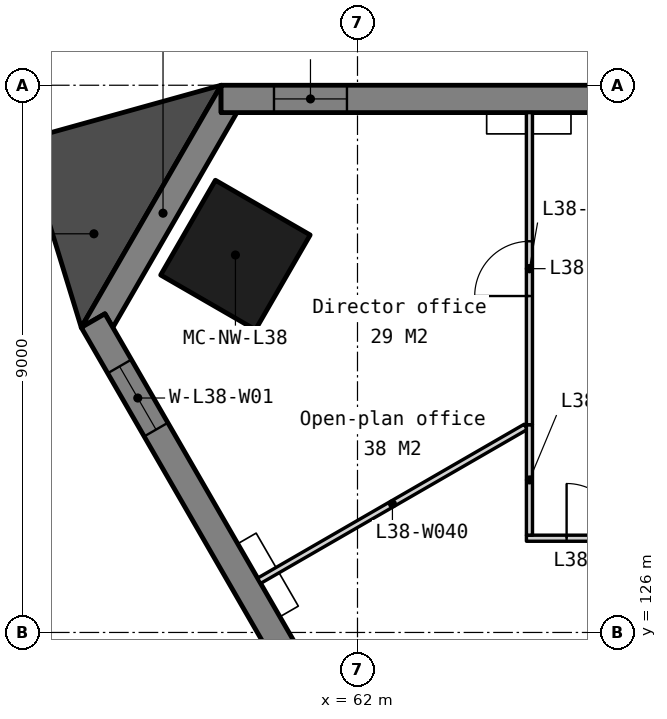
"""IFC4 building model, lengths in metres.
Left out: names, types, materials, properties, quantities, classifications, styles, units other than length and angle.
Written with IfcOpenShell. Run it as: python <this file> out.ifc"""

import sys

from ifc_helpers import new_model, si_unit, direction, frame, frame_2d, origin, origin_2d, place, context, subcontext, project, spatial, polyline, rectangle, outline, extrude, element, fill, save


model = new_model("IFC4")
c1 = context("Model", 3, precision=1e-05, world=origin(), true_north=direction((0.0, 1.0)))
c2 = subcontext(c1, "Body", "Model", "MODEL_VIEW")
j1 = project(units=[si_unit("LENGTHUNIT", "METRE"), si_unit("PLANEANGLEUNIT", "RADIAN")], contexts=[c1])
p1 = place(None, origin())
s1 = spatial("IfcSite", under=j1, at=p1, CompositionType="ELEMENT")
p2 = place(p1, origin())
s2 = spatial("IfcBuilding", under=s1, at=p2, CompositionType="ELEMENT")
p3 = place(p2, frame((0.0, 0.0, 152.0)))
s3 = spatial("IfcBuildingStorey", under=s2, at=p3, CompositionType="ELEMENT", Elevation=152.0)
p4 = place(p3, frame((59.993, 132.208, 0.0), z_axis=(0.0, 0.0, 1.0), x_axis=(-0.5, -0.866025403784, 0.0)))
e1 = element("IfcColumn", 1, at=p4, inside=s3, PredefinedType="COLUMN", context=c2, shape_type="SweptSolid", body=[
    extrude(rectangle(XDim=1.8, YDim=1.8, at=origin_2d()), origin(), (0.0, 0.0, 1.0), 3.9),
])
p5 = place(p3, frame((0.0, 0.0, -0.15)))
e2 = element("IfcWall", 2, at=p5, inside=s3, PredefinedType="SOLIDWALL", context=c2, shape_type="SweptSolid", body=[
    extrude(outline(polyline([(59.757, 135.0), (59.757, 134.55), (60.017, 134.55), (57.977, 131.016), (57.847, 131.241), (57.457, 131.016), (59.757, 135.0)])), origin(), (0.0, 0.0, 1.0), 3.9),
])
p6 = place(p3, frame((100.243, 134.775, -0.15), z_axis=(0.0, 0.0, 1.0), x_axis=(-1.0, 0.0, 0.0)))
e3 = element("IfcWall", 3, at=p6, inside=s3, PredefinedType="SOLIDWALL", context=c2, shape_type="SweptSolid", body=[
    extrude(outline(polyline([(40.486, 0.0), (40.486, 3.9), (0.0, 3.9), (0.0, 0.0), (40.486, 0.0)])), frame((0.0, 0.225, 0.0), z_axis=(0.0, -1.0, 0.0), x_axis=(1.0, 0.0, 0.0)), (0.0, 0.0, 1.0), 0.45),
])
p7 = place(p6, frame((0.87, 0.0, 0.95)))
e4 = element("IfcOpeningElement", 4, at=p7, cuts=e3, PredefinedType="OPENING", context=c2, shape_type="SweptSolid", body=[
    extrude(rectangle(XDim=1.2, YDim=2.2, at=frame_2d((0.6, 1.1))), frame((0.0, 0.235, 0.0), z_axis=(0.0, -1.0, 0.0), x_axis=(1.0, 0.0, 0.0)), (0.0, 0.0, 1.0), 0.47),
])
p8 = place(p6, frame((8.072, 0.0, 0.95)))
e5 = element("IfcOpeningElement", 5, at=p8, cuts=e3, PredefinedType="OPENING", context=c2, shape_type="SweptSolid", body=[
    extrude(rectangle(XDim=1.8, YDim=2.2, at=frame_2d((0.9, 1.1))), frame((0.0, 0.235, 0.0), z_axis=(0.0, -1.0, 0.0), x_axis=(1.0, 0.0, 0.0)), (0.0, 0.0, 1.0), 0.47),
])
p9 = place(p6, frame((10.372, 0.0, 0.95)))
e6 = element("IfcOpeningElement", 6, at=p9, cuts=e3, PredefinedType="OPENING", context=c2, shape_type="SweptSolid", body=[
    extrude(rectangle(XDim=1.8, YDim=2.2, at=frame_2d((0.9, 1.1))), frame((0.0, 0.235, 0.0), z_axis=(0.0, -1.0, 0.0), x_axis=(1.0, 0.0, 0.0)), (0.0, 0.0, 1.0), 0.47),
])
p10 = place(p6, frame((18.193, 0.0, 0.95)))
e7 = element("IfcOpeningElement", 7, at=p10, cuts=e3, PredefinedType="OPENING", context=c2, shape_type="SweptSolid", body=[
    extrude(rectangle(XDim=1.8, YDim=2.2, at=frame_2d((0.9, 1.1))), frame((0.0, 0.235, 0.0), z_axis=(0.0, -1.0, 0.0), x_axis=(1.0, 0.0, 0.0)), (0.0, 0.0, 1.0), 0.47),
])
p11 = place(p6, frame((20.493, 0.0, 0.95)))
e8 = element("IfcOpeningElement", 8, at=p11, cuts=e3, PredefinedType="OPENING", context=c2, shape_type="SweptSolid", body=[
    extrude(rectangle(XDim=1.8, YDim=2.2, at=frame_2d((0.9, 1.1))), frame((0.0, 0.235, 0.0), z_axis=(0.0, -1.0, 0.0), x_axis=(1.0, 0.0, 0.0)), (0.0, 0.0, 1.0), 0.47),
])
p12 = place(p6, frame((28.315, 0.0, 0.95)))
e9 = element("IfcOpeningElement", 9, at=p12, cuts=e3, PredefinedType="OPENING", context=c2, shape_type="SweptSolid", body=[
    extrude(rectangle(XDim=1.8, YDim=2.2, at=frame_2d((0.9, 1.1))), frame((0.0, 0.235, 0.0), z_axis=(0.0, -1.0, 0.0), x_axis=(1.0, 0.0, 0.0)), (0.0, 0.0, 1.0), 0.47),
])
p13 = place(p6, frame((30.615, 0.0, 0.95)))
e10 = element("IfcOpeningElement", 10, at=p13, cuts=e3, PredefinedType="OPENING", context=c2, shape_type="SweptSolid", body=[
    extrude(rectangle(XDim=1.8, YDim=2.2, at=frame_2d((0.9, 1.1))), frame((0.0, 0.235, 0.0), z_axis=(0.0, -1.0, 0.0), x_axis=(1.0, 0.0, 0.0)), (0.0, 0.0, 1.0), 0.47),
])
p14 = place(p6, frame((38.417, 0.0, 0.95)))
e11 = element("IfcOpeningElement", 11, at=p14, cuts=e3, PredefinedType="OPENING", context=c2, shape_type="SweptSolid", body=[
    extrude(rectangle(XDim=1.2, YDim=2.2, at=frame_2d((0.6, 1.1))), frame((0.0, 0.235, 0.0), z_axis=(0.0, -1.0, 0.0), x_axis=(1.0, 0.0, 0.0)), (0.0, 0.0, 1.0), 0.47),
])
p15 = place(p3, frame((57.652, 131.129, -0.15), z_axis=(0.0, 0.0, 1.0), x_axis=(0.50000511266, -0.866022451969, 0.0)))
e12 = element("IfcWall", 12, at=p15, inside=s3, PredefinedType="SOLIDWALL", context=c2, shape_type="SweptSolid", body=[
    extrude(outline(polyline([(0.0, 0.0), (0.0, 3.9), (18.243, 3.9), (18.243, 0.0), (0.0, 0.0)])), frame((0.0, 0.225, 0.0), z_axis=(0.0, -1.0, 0.0), x_axis=(1.0, 0.0, 0.0)), (0.0, 0.0, 1.0), 0.45),
])
p16 = place(p15, frame((0.87, 0.0, 0.95)))
e13 = element("IfcOpeningElement", 13, at=p16, cuts=e12, PredefinedType="OPENING", context=c2, shape_type="SweptSolid", body=[
    extrude(rectangle(XDim=1.2, YDim=2.2, at=frame_2d((0.6, 1.1))), frame((0.0, 0.235, 0.0), z_axis=(0.0, -1.0, 0.0), x_axis=(1.0, 0.0, 0.0)), (0.0, 0.0, 1.0), 0.47),
])
p17 = place(p15, frame((8.072, 0.0, 0.95)))
e14 = element("IfcOpeningElement", 14, at=p17, cuts=e12, PredefinedType="OPENING", context=c2, shape_type="SweptSolid", body=[
    extrude(rectangle(XDim=1.8, YDim=2.2, at=frame_2d((0.9, 1.1))), frame((0.0, 0.235, 0.0), z_axis=(0.0, -1.0, 0.0), x_axis=(1.0, 0.0, 0.0)), (0.0, 0.0, 1.0), 0.47),
])
p18 = place(p15, frame((10.372, 0.0, 0.95)))
e15 = element("IfcOpeningElement", 15, at=p18, cuts=e12, PredefinedType="OPENING", context=c2, shape_type="SweptSolid", body=[
    extrude(rectangle(XDim=1.8, YDim=2.2, at=frame_2d((0.9, 1.1))), frame((0.0, 0.235, 0.0), z_axis=(0.0, -1.0, 0.0), x_axis=(1.0, 0.0, 0.0)), (0.0, 0.0, 1.0), 0.47),
])
p19 = place(p3, frame((0.0, 0.0, -0.15)))
e16 = element("IfcWall", 16, at=p19, inside=s3, PredefinedType="SOLIDWALL", context=c2, shape_type="SweptSolid", body=[
    extrude(outline(polyline([(59.757, 135.0), (56.512, 134.097), (57.457, 131.016), (59.757, 135.0)])), origin(), (0.0, 0.0, 1.0), 3.9),
])
p20 = place(p3, frame((64.778, 127.55, 0.0), z_axis=(0.0, 0.0, 1.0), x_axis=(1.0, 0.0, 0.0)))
e17 = element("IfcWall", 17, at=p20, inside=s3, PredefinedType="PARTITIONING", context=c2, shape_type="SweptSolid", body=[
    extrude(rectangle(XDim=2.222, YDim=0.1, at=frame_2d((1.111, 0.0))), origin(), (0.0, 0.0, 1.0), 3.75),
])
p21 = place(p20, frame((0.661, 0.0, 0.0)))
e18 = element("IfcOpeningElement", 18, at=p21, cuts=e17, PredefinedType="OPENING", context=c2, shape_type="SweptSolid", body=[
    extrude(rectangle(XDim=0.9, YDim=2.1, at=frame_2d((0.45, 1.05))), frame((0.0, 0.06, 0.0), z_axis=(0.0, -1.0, 0.0), x_axis=(1.0, 0.0, 0.0)), (0.0, 0.0, 1.0), 0.12),
])
p22 = place(p3, frame((60.382, 126.85, 0.0), z_axis=(0.0, 0.0, 1.0), x_axis=(0.866041859802, 0.499971496258, 0.0)))
e19 = element("IfcWall", 19, at=p22, inside=s3, PredefinedType="PARTITIONING", context=c2, shape_type="SweptSolid", body=[
    extrude(rectangle(XDim=5.063, YDim=0.1, at=frame_2d((2.532, 0.0))), origin(), (0.0, 0.0, 1.0), 3.75),
])
p23 = place(p3, frame((64.828, 127.6, 0.0), z_axis=(0.0, 0.0, 1.0), x_axis=(-0.000268781068, 0.999999963878, 0.0)))
e20 = element("IfcWall", 20, at=p23, inside=s3, PredefinedType="PARTITIONING", context=c2, shape_type="SweptSolid", body=[
    extrude(rectangle(XDim=1.817, YDim=0.1, at=frame_2d((0.908, 0.0))), origin(), (0.0, 0.0, 1.0), 3.75),
])
p24 = place(p3, frame((64.828, 129.417, 0.0), z_axis=(0.0, 0.0, 1.0), x_axis=(0.0, 1.0, 0.0)))
e21 = element("IfcWall", 21, at=p24, inside=s3, PredefinedType="PARTITIONING", context=c2, shape_type="SweptSolid", body=[
    extrude(rectangle(XDim=5.133, YDim=0.1, at=frame_2d((2.567, 0.0))), origin(), (0.0, 0.0, 1.0), 3.75),
])
p25 = place(p24, frame((2.117, 0.0, 0.0)))
e22 = element("IfcOpeningElement", 22, at=p25, cuts=e21, PredefinedType="OPENING", context=c2, shape_type="SweptSolid", body=[
    extrude(rectangle(XDim=0.9, YDim=2.1, at=frame_2d((0.45, 1.05))), frame((0.0, 0.06, 0.0), z_axis=(0.0, -1.0, 0.0), x_axis=(1.0, 0.0, 0.0)), (0.0, 0.0, 1.0), 0.12),
])
p26 = place(p14, origin())
e23 = element("IfcWindow", 23, at=p26, inside=s3, PartitioningType="SINGLE_PANEL", PredefinedType="WINDOW", context=c2, shape_type="SweptSolid", body=[
    extrude(rectangle(XDim=1.2, YDim=2.2, at=frame_2d((0.6, 1.1))), frame((0.0, 0.03, 0.0), z_axis=(0.0, -1.0, 0.0), x_axis=(1.0, 0.0, 0.0)), (0.0, 0.0, 1.0), 0.06),
])
fill(e11, e23)
p27 = place(p16, origin())
e24 = element("IfcWindow", 24, at=p27, inside=s3, PartitioningType="SINGLE_PANEL", PredefinedType="WINDOW", context=c2, shape_type="SweptSolid", body=[
    extrude(rectangle(XDim=1.2, YDim=2.2, at=frame_2d((0.6, 1.1))), frame((0.0, 0.03, 0.0), z_axis=(0.0, -1.0, 0.0), x_axis=(1.0, 0.0, 0.0)), (0.0, 0.0, 1.0), 0.06),
])
fill(e13, e24)
p28 = place(p21, origin())
e25 = element("IfcDoor", 25, at=p28, inside=s3, OperationType="SINGLE_SWING_LEFT", PredefinedType="DOOR", context=c2, shape_type="SweptSolid", body=[
    extrude(rectangle(XDim=0.9, YDim=2.1, at=frame_2d((0.45, 1.05))), frame((0.0, 0.025, 0.0), z_axis=(0.0, -1.0, 0.0), x_axis=(1.0, 0.0, 0.0)), (0.0, 0.0, 1.0), 0.05),
])
fill(e18, e25)
p29 = place(p25, origin())
e26 = element("IfcDoor", 26, at=p29, inside=s3, OperationType="SINGLE_SWING_LEFT", PredefinedType="DOOR", context=c2, shape_type="SweptSolid", body=[
    extrude(rectangle(XDim=0.9, YDim=2.1, at=frame_2d((0.45, 1.05))), frame((0.0, 0.025, 0.0), z_axis=(0.0, -1.0, 0.0), x_axis=(1.0, 0.0, 0.0)), (0.0, 0.0, 1.0), 0.05),
])
fill(e22, e26)
save(model, sys.argv[1])
